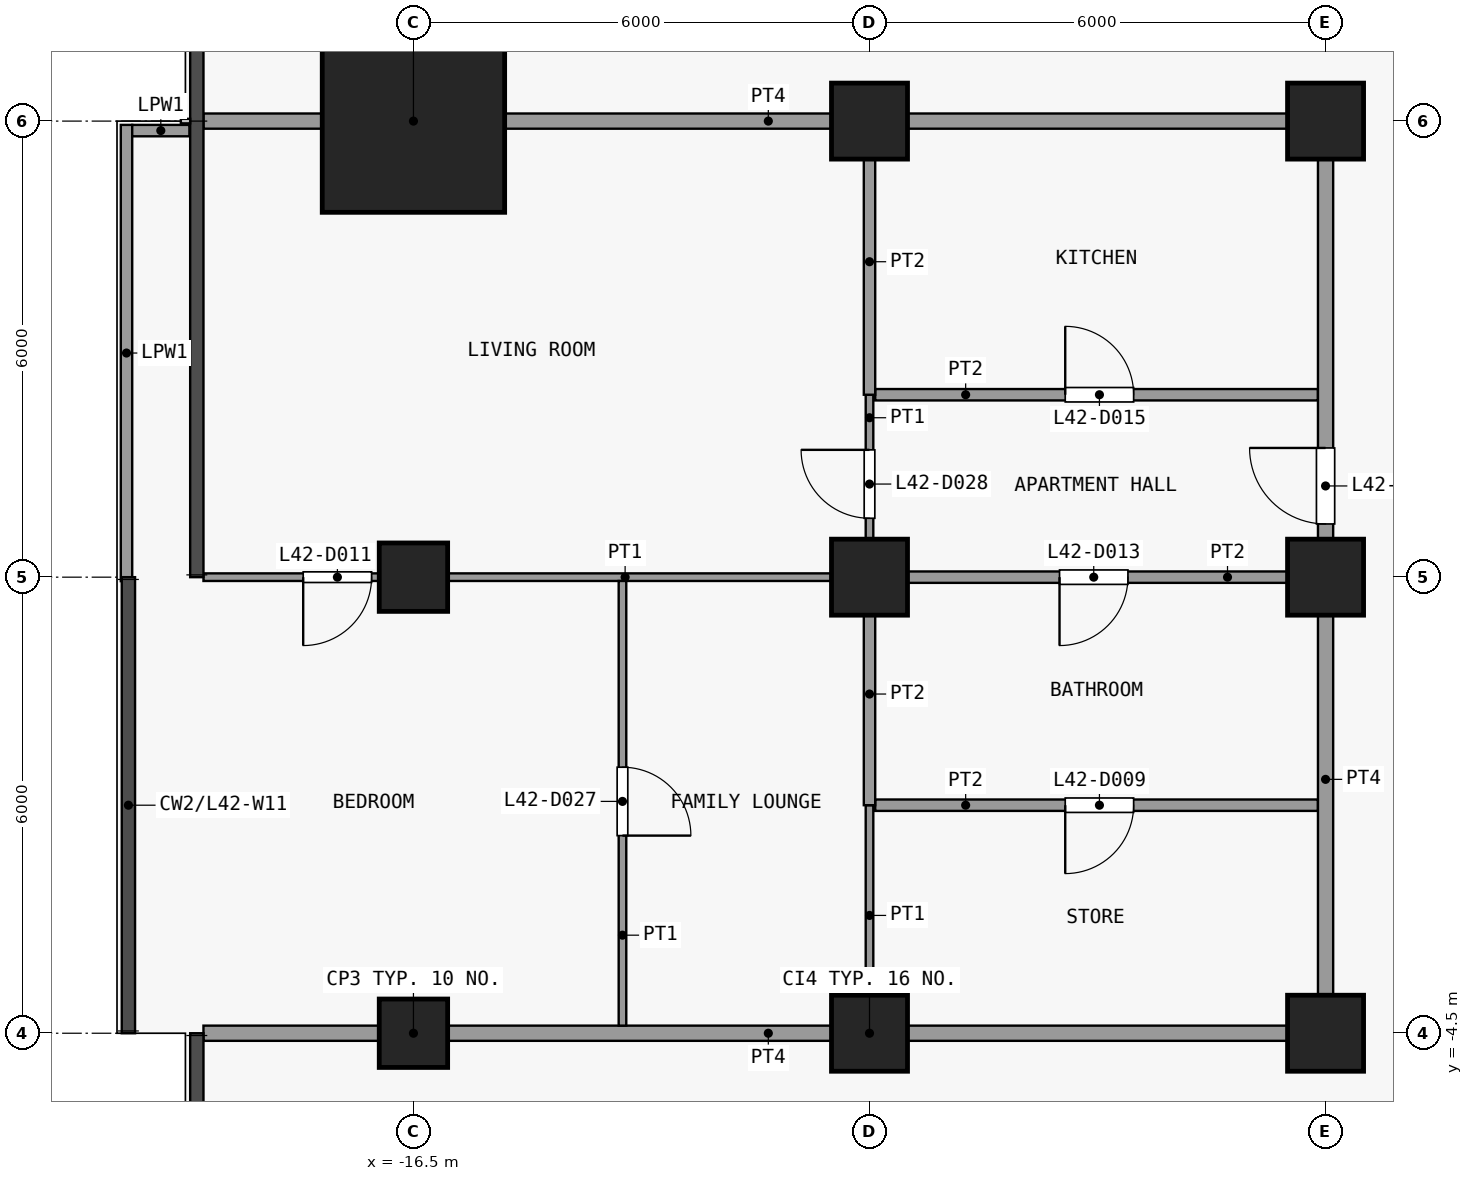
"""IFC4 building model, lengths in metres.
Left out: names, types, materials, properties, quantities, classifications, styles, units other than length and angle.
Written with IfcOpenShell. Run it as: python <this file> out.ifc"""

import sys

from ifc_helpers import new_model, si_unit, direction, frame, frame_2d, origin, origin_2d, place, context, subcontext, project, spatial, rectangle, extrude, element, fill, save


model = new_model("IFC4")
c1 = context("Model", 3, precision=1e-05, world=origin(), true_north=direction((0.0, 1.0)))
c2 = subcontext(c1, "Body", "Model", "MODEL_VIEW")
j1 = project(units=[si_unit("LENGTHUNIT", "METRE"), si_unit("PLANEANGLEUNIT", "RADIAN")], contexts=[c1])
p1 = place(None, origin())
s1 = spatial("IfcSite", under=j1, at=p1, CompositionType="ELEMENT")
p2 = place(p1, origin())
s2 = spatial("IfcBuilding", under=s1, at=p2, CompositionType="ELEMENT")
p3 = place(p2, frame((0.0, 0.0, 170.9)))
s3 = spatial("IfcBuildingStorey", under=s2, at=p3, CompositionType="ELEMENT", Elevation=170.9)
for number, where, z_axis, x_axis in (
    (1, (-16.5, -4.5, 0.0), (0.0, 0.0, 1.0), (1.0, 0.0, 0.0)),
    (2, (-16.5, 1.5, 0.0), (0.0, 0.0, 1.0), (1.0, 0.0, 0.0)),
):
    element("IfcColumn", number, at=place(p3, frame(where, z_axis=z_axis, x_axis=x_axis)), inside=s3, PredefinedType="COLUMN", context=c2, shape_type="SweptSolid", body=[
        extrude(rectangle(XDim=0.9, YDim=0.9, at=origin_2d()), origin(), (0.0, 0.0, 1.0), 3.6),
    ])
p4 = place(p3, frame((-16.5, 7.5, 0.0), z_axis=(0.0, 0.0, 1.0), x_axis=(1.0, 0.0, 0.0)))
e3 = element("IfcColumn", 3, at=p4, inside=s3, PredefinedType="COLUMN", context=c2, shape_type="SweptSolid", body=[
    extrude(rectangle(XDim=2.4, YDim=2.4, at=origin_2d()), origin(), (0.0, 0.0, 1.0), 3.6),
])
for number, where, z_axis, x_axis in (
    (4, (-10.5, -4.5, 0.0), (0.0, 0.0, 1.0), (1.0, 0.0, 0.0)),
    (5, (-10.5, 1.5, 0.0), (0.0, 0.0, 1.0), (1.0, 0.0, 0.0)),
    (6, (-10.5, 7.5, 0.0), (0.0, 0.0, 1.0), (1.0, 0.0, 0.0)),
    (7, (-4.5, -4.5, 0.0), (0.0, 0.0, 1.0), (1.0, 0.0, 0.0)),
    (8, (-4.5, 1.5, 0.0), (0.0, 0.0, 1.0), (1.0, 0.0, 0.0)),
    (9, (-4.5, 7.5, 0.0), (0.0, 0.0, 1.0), (1.0, 0.0, 0.0)),
):
    element("IfcColumn", number, at=place(p3, frame(where, z_axis=z_axis, x_axis=x_axis)), inside=s3, PredefinedType="COLUMN", context=c2, shape_type="SweptSolid", body=[
        extrude(rectangle(XDim=1.0, YDim=1.0, at=origin_2d()), origin(), (0.0, 0.0, 1.0), 3.6),
    ])
p5 = place(p3, frame((-20.275, 1.448, 0.0), z_axis=(0.0, 0.0, 1.0), x_axis=(0.0, 1.0, 0.0)))
e10 = element("IfcWall", 10, at=p5, inside=s3, PredefinedType="PARAPET", context=c2, shape_type="SweptSolid", body=[
    extrude(rectangle(XDim=6.002, YDim=0.15, at=frame_2d((3.001, 0.0))), origin(), (0.0, 0.0, 1.0), 1.15),
])
p6 = place(p3, frame((-20.2, 7.375, 0.0), z_axis=(0.0, 0.0, 1.0), x_axis=(1.0, 0.0, 0.0)))
e11 = element("IfcWall", 11, at=p6, inside=s3, PredefinedType="PARAPET", context=c2, shape_type="SweptSolid", body=[
    extrude(rectangle(XDim=0.752, YDim=0.15, at=frame_2d((0.376, 0.0))), origin(), (0.0, 0.0, 1.0), 1.15),
])
p7 = place(p3, frame((-19.262, -4.5, 0.0), z_axis=(0.0, 0.0, 1.0), x_axis=(1.0, 0.0, 0.0)))
e12 = element("IfcWall", 12, at=p7, inside=s3, PredefinedType="PARTITIONING", context=c2, shape_type="SweptSolid", body=[
    extrude(rectangle(XDim=14.863, YDim=0.2, at=frame_2d((7.431, 0.0))), origin(), (0.0, 0.0, 1.0), 3.3),
])
p8 = place(p3, frame((-10.425, -1.5, 0.0), z_axis=(0.0, 0.0, 1.0), x_axis=(1.0, 0.0, 0.0)))
e13 = element("IfcWall", 13, at=p8, inside=s3, PredefinedType="PARTITIONING", context=c2, shape_type="SweptSolid", body=[
    extrude(rectangle(XDim=5.825, YDim=0.15, at=frame_2d((2.913, 0.0))), origin(), (0.0, 0.0, 1.0), 3.3),
])
p9 = place(p8, frame((2.5, 0.0, 0.0)))
e14 = element("IfcOpeningElement", 14, at=p9, cuts=e13, PredefinedType="OPENING", context=c2, shape_type="SweptSolid", body=[
    extrude(rectangle(XDim=0.9, YDim=2.1, at=frame_2d((0.45, 1.05))), frame((0.0, 0.085, 0.0), z_axis=(0.0, -1.0, 0.0), x_axis=(1.0, 0.0, 0.0)), (0.0, 0.0, 1.0), 0.17),
])
p10 = place(p3, frame((-19.262, 1.5, 0.0), z_axis=(0.0, 0.0, 1.0), x_axis=(1.0, 0.0, 0.0)))
e15 = element("IfcWall", 15, at=p10, inside=s3, PredefinedType="PARTITIONING", context=c2, shape_type="SweptSolid", body=[
    extrude(rectangle(XDim=8.762, YDim=0.1, at=frame_2d((4.381, 0.0))), origin(), (0.0, 0.0, 1.0), 3.3),
])
p11 = place(p10, frame((1.312, 0.0, 0.0)))
e16 = element("IfcOpeningElement", 16, at=p11, cuts=e15, PredefinedType="OPENING", context=c2, shape_type="SweptSolid", body=[
    extrude(rectangle(XDim=0.9, YDim=2.1, at=frame_2d((0.45, 1.05))), frame((0.0, 0.06, 0.0), z_axis=(0.0, -1.0, 0.0), x_axis=(1.0, 0.0, 0.0)), (0.0, 0.0, 1.0), 0.12),
])
p12 = place(p3, frame((-10.5, 1.5, 0.0), z_axis=(0.0, 0.0, 1.0), x_axis=(1.0, 0.0, 0.0)))
e17 = element("IfcWall", 17, at=p12, inside=s3, PredefinedType="PARTITIONING", context=c2, shape_type="SweptSolid", body=[
    extrude(rectangle(XDim=5.9, YDim=0.15, at=frame_2d((2.95, 0.0))), origin(), (0.0, 0.0, 1.0), 3.3),
])
p13 = place(p12, frame((2.5, 0.0, 0.0)))
e18 = element("IfcOpeningElement", 18, at=p13, cuts=e17, PredefinedType="OPENING", context=c2, shape_type="SweptSolid", body=[
    extrude(rectangle(XDim=0.9, YDim=2.1, at=frame_2d((0.45, 1.05))), frame((0.0, 0.085, 0.0), z_axis=(0.0, -1.0, 0.0), x_axis=(1.0, 0.0, 0.0)), (0.0, 0.0, 1.0), 0.17),
])
p14 = place(p3, frame((-10.425, 3.9, 0.0), z_axis=(0.0, 0.0, 1.0), x_axis=(1.0, 0.0, 0.0)))
e19 = element("IfcWall", 19, at=p14, inside=s3, PredefinedType="PARTITIONING", context=c2, shape_type="SweptSolid", body=[
    extrude(rectangle(XDim=5.825, YDim=0.15, at=frame_2d((2.913, 0.0))), origin(), (0.0, 0.0, 1.0), 3.3),
])
p15 = place(p14, frame((2.5, 0.0, 0.0)))
e20 = element("IfcOpeningElement", 20, at=p15, cuts=e19, PredefinedType="OPENING", context=c2, shape_type="SweptSolid", body=[
    extrude(rectangle(XDim=0.9, YDim=2.1, at=frame_2d((0.45, 1.05))), frame((0.0, 0.085, 0.0), z_axis=(0.0, -1.0, 0.0), x_axis=(1.0, 0.0, 0.0)), (0.0, 0.0, 1.0), 0.17),
])
p16 = place(p3, frame((-19.262, 7.5, 0.0), z_axis=(0.0, 0.0, 1.0), x_axis=(1.0, 0.0, 0.0)))
e21 = element("IfcWall", 21, at=p16, inside=s3, PredefinedType="PARTITIONING", context=c2, shape_type="SweptSolid", body=[
    extrude(rectangle(XDim=14.863, YDim=0.2, at=frame_2d((7.431, 0.0))), origin(), (0.0, 0.0, 1.0), 3.3),
])
p17 = place(p3, frame((-13.75, -4.4, 0.0), z_axis=(0.0, 0.0, 1.0), x_axis=(0.0, 1.0, 0.0)))
e22 = element("IfcWall", 22, at=p17, inside=s3, PredefinedType="PARTITIONING", context=c2, shape_type="SweptSolid", body=[
    extrude(rectangle(XDim=5.85, YDim=0.1, at=frame_2d((2.925, 0.0))), origin(), (0.0, 0.0, 1.0), 3.3),
])
p18 = place(p17, frame((2.5, 0.0, 0.0)))
e23 = element("IfcOpeningElement", 23, at=p18, cuts=e22, PredefinedType="OPENING", context=c2, shape_type="SweptSolid", body=[
    extrude(rectangle(XDim=0.9, YDim=2.1, at=frame_2d((0.45, 1.05))), frame((0.0, 0.06, 0.0), z_axis=(0.0, -1.0, 0.0), x_axis=(1.0, 0.0, 0.0)), (0.0, 0.0, 1.0), 0.12),
])
p19 = place(p3, frame((-10.5, -4.4, 0.0), z_axis=(0.0, 0.0, 1.0), x_axis=(0.0, 1.0, 0.0)))
e24 = element("IfcWall", 24, at=p19, inside=s3, PredefinedType="PARTITIONING", context=c2, shape_type="SweptSolid", body=[
    extrude(rectangle(XDim=2.9, YDim=0.1, at=frame_2d((1.45, 0.0))), origin(), (0.0, 0.0, 1.0), 3.3),
])
p20 = place(p3, frame((-10.5, 1.575, 0.0), z_axis=(0.0, 0.0, 1.0), x_axis=(0.0, 1.0, 0.0)))
e25 = element("IfcWall", 25, at=p20, inside=s3, PredefinedType="PARTITIONING", context=c2, shape_type="SweptSolid", body=[
    extrude(rectangle(XDim=2.325, YDim=0.1, at=frame_2d((1.163, 0.0))), origin(), (0.0, 0.0, 1.0), 3.3),
])
p21 = place(p20, frame((0.7, 0.0, 0.0)))
e26 = element("IfcOpeningElement", 26, at=p21, cuts=e25, PredefinedType="OPENING", context=c2, shape_type="SweptSolid", body=[
    extrude(rectangle(XDim=0.9, YDim=2.1, at=frame_2d((0.45, 1.05))), frame((0.0, 0.06, 0.0), z_axis=(0.0, -1.0, 0.0), x_axis=(1.0, 0.0, 0.0)), (0.0, 0.0, 1.0), 0.12),
])
p22 = place(p3, frame((-10.5, -1.5, 0.0), z_axis=(0.0, 0.0, 1.0), x_axis=(0.0, 1.0, 0.0)))
e27 = element("IfcWall", 27, at=p22, inside=s3, PredefinedType="PARTITIONING", context=c2, shape_type="SweptSolid", body=[
    extrude(rectangle(XDim=2.925, YDim=0.15, at=frame_2d((1.462, 0.0))), origin(), (0.0, 0.0, 1.0), 3.3),
])
p23 = place(p3, frame((-10.5, 3.9, 0.0), z_axis=(0.0, 0.0, 1.0), x_axis=(0.0, 1.0, 0.0)))
e28 = element("IfcWall", 28, at=p23, inside=s3, PredefinedType="PARTITIONING", context=c2, shape_type="SweptSolid", body=[
    extrude(rectangle(XDim=3.5, YDim=0.15, at=frame_2d((1.75, 0.0))), origin(), (0.0, 0.0, 1.0), 3.3),
])
p24 = place(p3, frame((-4.5, -4.4, 0.0), z_axis=(0.0, 0.0, 1.0), x_axis=(0.0, 1.0, 0.0)))
e29 = element("IfcWall", 29, at=p24, inside=s3, PredefinedType="PARTITIONING", context=c2, shape_type="SweptSolid", body=[
    extrude(rectangle(XDim=11.8, YDim=0.2, at=frame_2d((5.9, 0.0))), origin(), (0.0, 0.0, 1.0), 3.3),
])
p25 = place(p24, frame((6.6, 0.0, 0.0)))
e30 = element("IfcOpeningElement", 30, at=p25, cuts=e29, PredefinedType="OPENING", context=c2, shape_type="SweptSolid", body=[
    extrude(rectangle(XDim=1.0, YDim=2.1, at=frame_2d((0.5, 1.05))), frame((0.0, 0.11, 0.0), z_axis=(0.0, -1.0, 0.0), x_axis=(1.0, 0.0, 0.0)), (0.0, 0.0, 1.0), 0.22),
])
p26 = place(p9, origin())
e31 = element("IfcDoor", 31, at=p26, inside=s3, OperationType="SINGLE_SWING_LEFT", PredefinedType="DOOR", context=c2, shape_type="SweptSolid", body=[
    extrude(rectangle(XDim=0.9, YDim=2.1, at=frame_2d((0.45, 1.05))), frame((0.0, 0.025, 0.0), z_axis=(0.0, -1.0, 0.0), x_axis=(1.0, 0.0, 0.0)), (0.0, 0.0, 1.0), 0.05),
])
fill(e14, e31)
p27 = place(p11, origin())
e32 = element("IfcDoor", 32, at=p27, inside=s3, OperationType="SINGLE_SWING_LEFT", PredefinedType="DOOR", context=c2, shape_type="SweptSolid", body=[
    extrude(rectangle(XDim=0.9, YDim=2.1, at=frame_2d((0.45, 1.05))), frame((0.0, 0.025, 0.0), z_axis=(0.0, -1.0, 0.0), x_axis=(1.0, 0.0, 0.0)), (0.0, 0.0, 1.0), 0.05),
])
fill(e16, e32)
p28 = place(p13, origin())
e33 = element("IfcDoor", 33, at=p28, inside=s3, OperationType="SINGLE_SWING_LEFT", PredefinedType="DOOR", context=c2, shape_type="SweptSolid", body=[
    extrude(rectangle(XDim=0.9, YDim=2.1, at=frame_2d((0.45, 1.05))), frame((0.0, 0.025, 0.0), z_axis=(0.0, -1.0, 0.0), x_axis=(1.0, 0.0, 0.0)), (0.0, 0.0, 1.0), 0.05),
])
fill(e18, e33)
p29 = place(p15, origin())
e34 = element("IfcDoor", 34, at=p29, inside=s3, OperationType="SINGLE_SWING_RIGHT", PredefinedType="DOOR", context=c2, shape_type="SweptSolid", body=[
    extrude(rectangle(XDim=0.9, YDim=2.1, at=frame_2d((0.45, 1.05))), frame((0.0, 0.025, 0.0), z_axis=(0.0, -1.0, 0.0), x_axis=(1.0, 0.0, 0.0)), (0.0, 0.0, 1.0), 0.05),
])
fill(e20, e34)
p30 = place(p18, origin())
e35 = element("IfcDoor", 35, at=p30, inside=s3, OperationType="SINGLE_SWING_LEFT", PredefinedType="DOOR", context=c2, shape_type="SweptSolid", body=[
    extrude(rectangle(XDim=0.9, YDim=2.1, at=frame_2d((0.45, 1.05))), frame((0.0, 0.025, 0.0), z_axis=(0.0, -1.0, 0.0), x_axis=(1.0, 0.0, 0.0)), (0.0, 0.0, 1.0), 0.05),
])
fill(e23, e35)
p31 = place(p21, origin())
e36 = element("IfcDoor", 36, at=p31, inside=s3, OperationType="SINGLE_SWING_LEFT", PredefinedType="DOOR", context=c2, shape_type="SweptSolid", body=[
    extrude(rectangle(XDim=0.9, YDim=2.1, at=frame_2d((0.45, 1.05))), frame((0.0, 0.025, 0.0), z_axis=(0.0, -1.0, 0.0), x_axis=(1.0, 0.0, 0.0)), (0.0, 0.0, 1.0), 0.05),
])
fill(e26, e36)
p32 = place(p25, origin())
e37 = element("IfcDoor", 37, at=p32, inside=s3, OperationType="SINGLE_SWING_LEFT", PredefinedType="DOOR", context=c2, shape_type="SweptSolid", body=[
    extrude(rectangle(XDim=1.0, YDim=2.1, at=frame_2d((0.5, 1.05))), frame((0.0, 0.025, 0.0), z_axis=(0.0, -1.0, 0.0), x_axis=(1.0, 0.0, 0.0)), (0.0, 0.0, 1.0), 0.05),
])
fill(e30, e37)
save(model, sys.argv[1])
